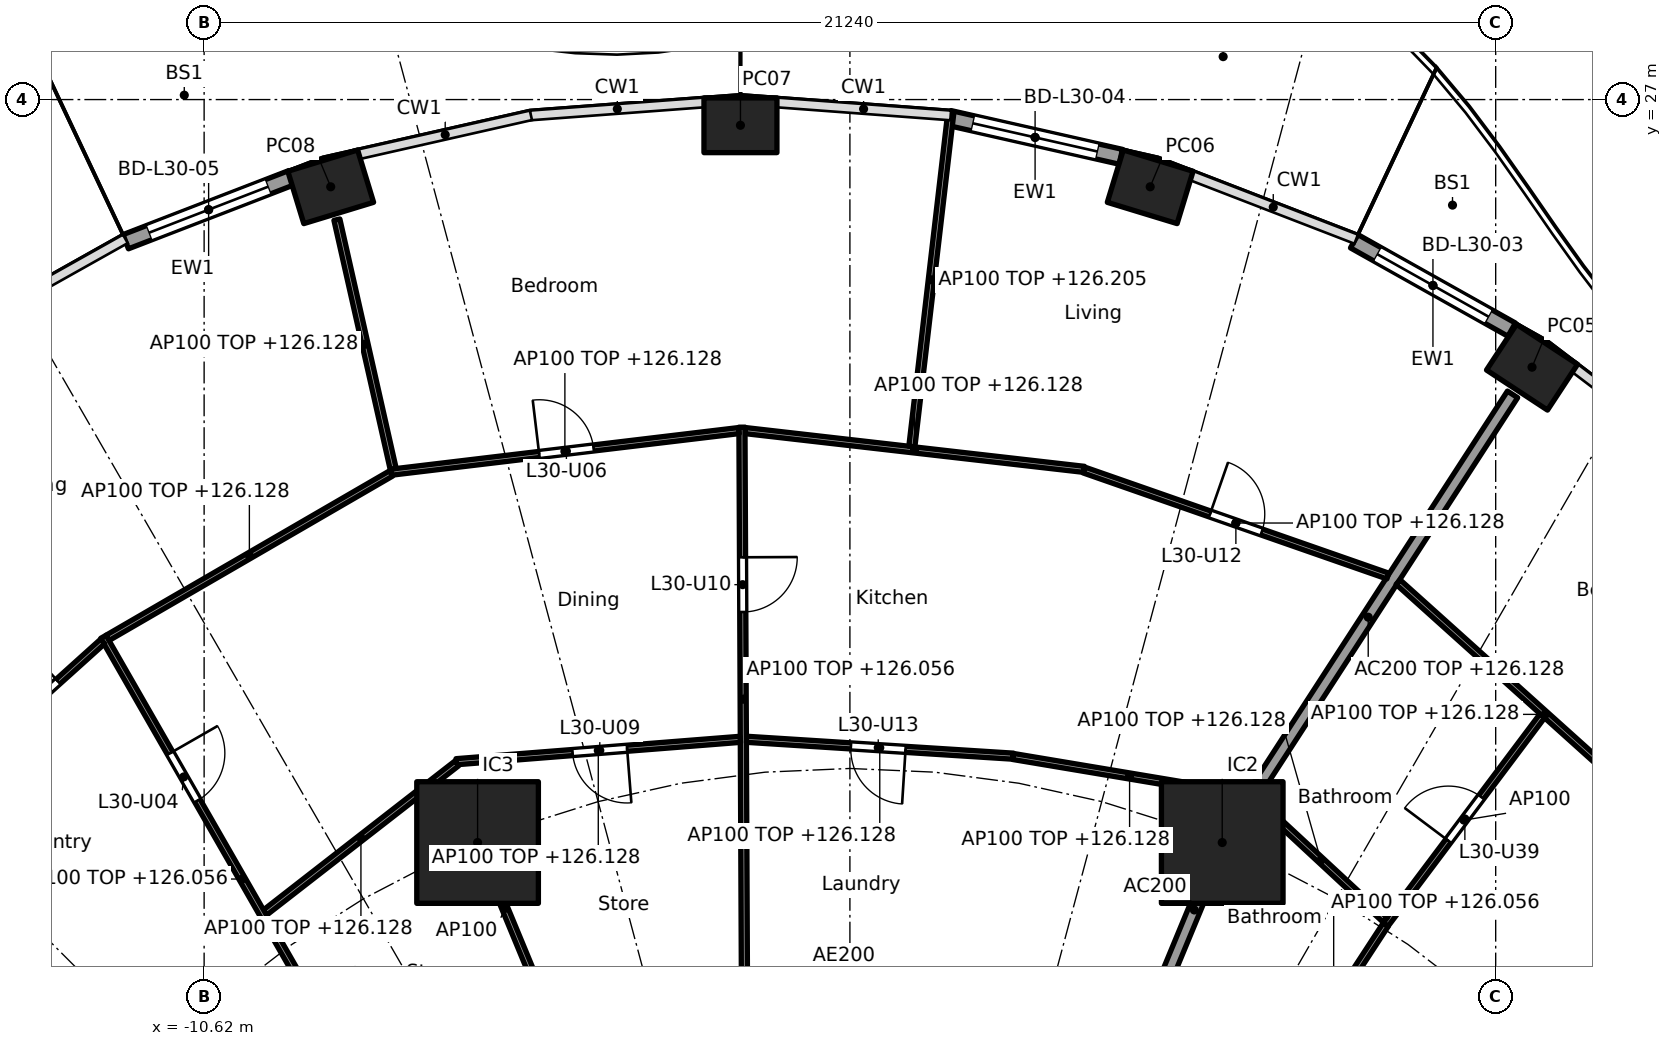
"""IFC4 building model, lengths in metres.
Left out: names, types, materials, properties, quantities, classifications, styles, units other than length and angle.
Written with IfcOpenShell. Run it as: python <this file> out.ifc"""

import sys

from ifc_helpers import new_model, si_unit, direction, frame, frame_2d, origin, origin_2d, place, context, subcontext, project, spatial, rectangle, hollow_rectangle, extrude, element, fill, save


model = new_model("IFC4")
c1 = context("Model", 3, precision=1e-05, world=origin(), true_north=direction((0.0, 1.0)))
c2 = subcontext(c1, "Body", "Model", "MODEL_VIEW")
j1 = project(units=[si_unit("LENGTHUNIT", "METRE"), si_unit("PLANEANGLEUNIT", "RADIAN")], contexts=[c1])
p1 = place(None, origin())
s1 = spatial("IfcSite", under=j1, at=p1, CompositionType="ELEMENT")
p2 = place(p1, origin())
s2 = spatial("IfcBuilding", under=s1, at=p2, CompositionType="ELEMENT")
p3 = place(p2, frame((0.0, 0.0, 123.3)))
s3 = spatial("IfcBuildingStorey", under=s2, at=p3, CompositionType="ELEMENT", Elevation=123.3)
for number, where, z_axis, x_axis in (
    (1, (11.218, 22.599, 0.0), (0.0, 0.0, 1.0), (-0.836, 0.549, 0.0)),
    (2, (4.938, 25.565, 0.0), (0.0, 0.0, 1.0), (-0.957, 0.292, 0.0)),
    (3, (-1.8, 26.577, 0.0), (0.0, 0.0, 1.0), (-1.0, 0.0, 0.0)),
    (4, (-8.538, 25.565, 0.0), (0.0, 0.0, 1.0), (-0.957, -0.292, 0.0)),
):
    element("IfcColumn", number, at=place(p3, frame(where, z_axis=z_axis, x_axis=x_axis)), inside=s3, PredefinedType="COLUMN", context=c2, shape_type="SweptSolid", body=[
        extrude(hollow_rectangle(XDim=1.2, YDim=0.9, WallThickness=0.04, at=origin_2d()), origin(), (0.0, 0.0, 1.0), 3.7),
    ])
for number, where, z_axis, x_axis in (
    (5, (6.123, 14.782, 0.0), (0.0, 0.0, 1.0), (1.0, 0.0, 0.0)),
    (6, (-6.123, 14.782, 0.0), (0.0, 0.0, 1.0), (1.0, 0.0, 0.0)),
):
    element("IfcColumn", number, at=place(p3, frame(where, z_axis=z_axis, x_axis=x_axis)), inside=s3, PredefinedType="COLUMN", context=c2, shape_type="SweptSolid", body=[
        extrude(rectangle(XDim=2.0, YDim=2.0, at=origin_2d()), origin(), (0.0, 0.0, 1.0), 3.7),
    ])
p4 = place(p3, frame((8.293, 24.67, 0.0), z_axis=(0.0, 0.0, 1.0), x_axis=(0.87206688547, -0.489386705241, 0.0)))
e7 = element("IfcWall", 7, at=p4, inside=s3, PredefinedType="SOLIDWALL", context=c2, shape_type="SweptSolid", body=[
    extrude(rectangle(XDim=2.97, YDim=0.25, at=frame_2d((1.485, 0.0))), origin(), (0.0, 0.0, 1.0), 3.44),
])
p5 = place(p4, frame((0.435, 0.0, 0.0)))
e8 = element("IfcOpeningElement", 8, at=p5, cuts=e7, PredefinedType="OPENING", context=c2, shape_type="SweptSolid", body=[
    extrude(rectangle(XDim=2.1, YDim=2.4, at=frame_2d((1.05, 1.2))), frame((0.0, 0.135, 0.0), z_axis=(0.0, -1.0, 0.0), x_axis=(1.0, 0.0, 0.0)), (0.0, 0.0, 1.0), 0.27),
])
p6 = place(p3, frame((1.636, 26.697, 0.0), z_axis=(0.0, 0.0, 1.0), x_axis=(0.975339035722, -0.220711951186, 0.0)))
e9 = element("IfcWall", 9, at=p6, inside=s3, PredefinedType="SOLIDWALL", context=c2, shape_type="SweptSolid", body=[
    extrude(rectangle(XDim=2.89, YDim=0.25, at=frame_2d((1.445, 0.0))), origin(), (0.0, 0.0, 1.0), 3.44),
])
p7 = place(p6, frame((0.395, 0.0, 0.0)))
e10 = element("IfcOpeningElement", 10, at=p7, cuts=e9, PredefinedType="OPENING", context=c2, shape_type="SweptSolid", body=[
    extrude(rectangle(XDim=2.1, YDim=2.4, at=frame_2d((1.05, 1.2))), frame((0.0, 0.135, 0.0), z_axis=(0.0, -1.0, 0.0), x_axis=(1.0, 0.0, 0.0)), (0.0, 0.0, 1.0), 0.27),
])
p8 = place(p3, frame((-11.909, 24.662, 0.0), z_axis=(0.0, 0.0, 1.0), x_axis=(0.932845344347, 0.360277064952, 0.0)))
e11 = element("IfcWall", 11, at=p8, inside=s3, PredefinedType="SOLIDWALL", context=c2, shape_type="SweptSolid", body=[
    extrude(rectangle(XDim=2.923, YDim=0.25, at=frame_2d((1.462, 0.0))), origin(), (0.0, 0.0, 1.0), 3.44),
])
p9 = place(p8, frame((0.412, 0.0, 0.0)))
e12 = element("IfcOpeningElement", 12, at=p9, cuts=e11, PredefinedType="OPENING", context=c2, shape_type="SweptSolid", body=[
    extrude(rectangle(XDim=2.1, YDim=2.4, at=frame_2d((1.05, 1.2))), frame((0.0, 0.135, 0.0), z_axis=(0.0, -1.0, 0.0), x_axis=(1.0, 0.0, 0.0)), (0.0, 0.0, 1.0), 0.27),
])
p10 = place(p3, frame((5.243, 12.657, 0.0), z_axis=(0.0, 0.0, 1.0), x_axis=(0.38273085373, 0.923859888513, 0.0)))
e13 = element("IfcWall", 13, at=p10, inside=s3, PredefinedType="PARTITIONING", context=c2, shape_type="SweptSolid", body=[
    extrude(rectangle(XDim=2.199, YDim=0.2, at=frame_2d((1.1, 0.0))), origin(), (0.0, 0.0, 1.0), 3.44),
])
p11 = place(p3, frame((6.15, 14.824, 0.0), z_axis=(0.0, 0.0, 1.0), x_axis=(0.543695254109, 0.839282711998, 0.0)))
e14 = element("IfcWall", 14, at=p11, inside=s3, PredefinedType="PARTITIONING", context=c2, shape_type="SweptSolid", body=[
    extrude(rectangle(XDim=8.731, YDim=0.2, at=frame_2d((4.366, 0.0))), origin(), (0.0, 0.0, 1.0), 2.828),
])
p12 = place(p3, frame((13.856, 14.714, 0.0), z_axis=(0.0, 0.0, 1.0), x_axis=(-0.743799395746, 0.668402916577, 0.0)))
e15 = element("IfcWall", 15, at=p12, inside=s3, PredefinedType="PARTITIONING", context=c2, shape_type="SweptSolid", body=[
    extrude(rectangle(XDim=6.509, YDim=0.1, at=frame_2d((3.254, 0.0))), origin(), (0.0, 0.0, 1.0), 2.828),
])
p13 = place(p12, frame((1.19, 0.0, 0.0)))
e16 = element("IfcOpeningElement", 16, at=p13, cuts=e15, PredefinedType="OPENING", context=c2, shape_type="SweptSolid", body=[
    extrude(rectangle(XDim=0.9, YDim=2.1, at=frame_2d((0.45, 1.05))), frame((0.0, 0.06, 0.0), z_axis=(0.0, -1.0, 0.0), x_axis=(1.0, 0.0, 0.0)), (0.0, 0.0, 1.0), 0.12),
])
p14 = place(p3, frame((7.099, 10.808, 0.0), z_axis=(0.0, 0.0, 1.0), x_axis=(0.546709757921, 0.837322184463, 0.0)))
e17 = element("IfcWall", 17, at=p14, inside=s3, PredefinedType="PARTITIONING", context=c2, shape_type="SweptSolid", body=[
    extrude(rectangle(XDim=3.134, YDim=0.1, at=frame_2d((1.567, 0.0))), origin(), (0.0, 0.0, 1.0), 2.756),
])
p15 = place(p14, frame((1.117, 0.0, 0.0)))
e18 = element("IfcOpeningElement", 18, at=p15, cuts=e17, PredefinedType="OPENING", context=c2, shape_type="SweptSolid", body=[
    extrude(rectangle(XDim=0.9, YDim=2.1, at=frame_2d((0.45, 1.05))), frame((0.0, 0.06, 0.0), z_axis=(0.0, -1.0, 0.0), x_axis=(1.0, 0.0, 0.0)), (0.0, 0.0, 1.0), 0.12),
])
p16 = place(p3, frame((8.81, 13.434, 0.0), z_axis=(0.0, 0.0, 1.0), x_axis=(0.600491337497, 0.799631261014, 0.0)))
e19 = element("IfcWall", 19, at=p16, inside=s3, PredefinedType="PARTITIONING", context=c2, shape_type="SweptSolid", body=[
    extrude(rectangle(XDim=4.292, YDim=0.1, at=frame_2d((2.146, 0.0))), origin(), (0.0, 0.0, 1.0), 3.44),
])
p17 = place(p16, frame((1.721, 0.0, 0.0)))
e20 = element("IfcOpeningElement", 20, at=p17, cuts=e19, PredefinedType="OPENING", context=c2, shape_type="SweptSolid", body=[
    extrude(rectangle(XDim=0.9, YDim=2.1, at=frame_2d((0.45, 1.05))), frame((0.0, 0.06, 0.0), z_axis=(0.0, -1.0, 0.0), x_axis=(1.0, 0.0, 0.0)), (0.0, 0.0, 1.0), 0.12),
])
p18 = place(p3, frame((8.803, 13.508, 0.0), z_axis=(0.0, 0.0, 1.0), x_axis=(-0.733124766325, 0.680094167745, 0.0)))
e21 = element("IfcWall", 21, at=p18, inside=s3, PredefinedType="PARTITIONING", context=c2, shape_type="SweptSolid", body=[
    extrude(rectangle(XDim=2.886, YDim=0.1, at=frame_2d((1.443, 0.0))), origin(), (0.0, 0.0, 1.0), 2.828),
])
p19 = place(p3, frame((6.515, 15.556, 0.0), z_axis=(0.0, 0.0, 1.0), x_axis=(-0.986271328884, 0.16513287323, 0.0)))
e22 = element("IfcWall", 22, at=p19, inside=s3, PredefinedType="PARTITIONING", context=c2, shape_type="SweptSolid", body=[
    extrude(rectangle(XDim=3.884, YDim=0.1, at=frame_2d((1.942, 0.0))), origin(), (0.0, 0.0, 1.0), 2.828),
])
p20 = place(p3, frame((8.846, 19.165, 0.0), z_axis=(0.0, 0.0, 1.0), x_axis=(-0.944186503813, 0.329411362915, 0.0)))
e23 = element("IfcWall", 23, at=p20, inside=s3, PredefinedType="PARTITIONING", context=c2, shape_type="SweptSolid", body=[
    extrude(rectangle(XDim=5.293, YDim=0.1, at=frame_2d((2.646, 0.0))), origin(), (0.0, 0.0, 1.0), 2.828),
])
p21 = place(p20, frame((2.197, 0.0, 0.0)))
e24 = element("IfcOpeningElement", 24, at=p21, cuts=e23, PredefinedType="OPENING", context=c2, shape_type="SweptSolid", body=[
    extrude(rectangle(XDim=0.9, YDim=2.1, at=frame_2d((0.45, 1.05))), frame((0.0, 0.06, 0.0), z_axis=(0.0, -1.0, 0.0), x_axis=(1.0, 0.0, 0.0)), (0.0, 0.0, 1.0), 0.12),
])
p22 = place(p3, frame((2.685, 16.202, 0.0), z_axis=(0.0, 0.0, 1.0), x_axis=(-0.998000808042, 0.063201164138, 0.0)))
e25 = element("IfcWall", 25, at=p22, inside=s3, PredefinedType="PARTITIONING", context=c2, shape_type="SweptSolid", body=[
    extrude(rectangle(XDim=4.396, YDim=0.1, at=frame_2d((2.198, 0.0))), origin(), (0.0, 0.0, 1.0), 2.828),
])
p23 = place(p22, frame((1.773, 0.0, 0.0)))
e26 = element("IfcOpeningElement", 26, at=p23, cuts=e25, PredefinedType="OPENING", context=c2, shape_type="SweptSolid", body=[
    extrude(rectangle(XDim=0.9, YDim=2.1, at=frame_2d((0.45, 1.05))), frame((0.0, 0.06, 0.0), z_axis=(0.0, -1.0, 0.0), x_axis=(1.0, 0.0, 0.0)), (0.0, 0.0, 1.0), 0.12),
])
p24 = place(p3, frame((3.851, 20.919, 0.0), z_axis=(0.0, 0.0, 1.0), x_axis=(-0.993519908136, 0.11365822512, 0.0)))
e27 = element("IfcWall", 27, at=p24, inside=s3, PredefinedType="PARTITIONING", context=c2, shape_type="SweptSolid", body=[
    extrude(rectangle(XDim=5.613, YDim=0.1, at=frame_2d((2.806, 0.0))), origin(), (0.0, 0.0, 1.0), 2.828),
])
p25 = place(p3, frame((1.019, 21.293, 0.0), z_axis=(0.0, 0.0, 1.0), x_axis=(0.11589741608, 0.993261188684, 0.0)))
e28 = element("IfcWall", 28, at=p25, inside=s3, PredefinedType="PARTITIONING", context=c2, shape_type="SweptSolid", body=[
    extrude(rectangle(XDim=5.523, YDim=0.1, at=frame_2d((2.762, 0.0))), origin(), (0.0, 0.0, 1.0), 2.905),
])
p26 = place(p3, frame((-1.735, 12.665, 0.0), z_axis=(0.0, 0.0, 1.0), x_axis=(-0.004474716456, 0.999989988406, 0.0)))
e29 = element("IfcWall", 29, at=p26, inside=s3, PredefinedType="PARTITIONING", context=c2, shape_type="SweptSolid", body=[
    extrude(rectangle(XDim=8.948, YDim=0.1, at=frame_2d((4.474, 0.0))), origin(), (0.0, 0.0, 1.0), 2.756),
])
p27 = place(p26, frame((5.908, 0.0, 0.0)))
e30 = element("IfcOpeningElement", 30, at=p27, cuts=e29, PredefinedType="OPENING", context=c2, shape_type="SweptSolid", body=[
    extrude(rectangle(XDim=0.9, YDim=2.1, at=frame_2d((0.45, 1.05))), frame((0.0, 0.06, 0.0), z_axis=(0.0, -1.0, 0.0), x_axis=(1.0, 0.0, 0.0)), (0.0, 0.0, 1.0), 0.12),
])
p28 = place(p3, frame((-1.802, 16.479, 0.0), z_axis=(0.0, 0.0, 1.0), x_axis=(-0.996909003513, -0.078564869469, 0.0)))
e31 = element("IfcWall", 31, at=p28, inside=s3, PredefinedType="PARTITIONING", context=c2, shape_type="SweptSolid", body=[
    extrude(rectangle(XDim=4.686, YDim=0.1, at=frame_2d((2.343, 0.0))), origin(), (0.0, 0.0, 1.0), 2.828),
])
p29 = place(p28, frame((1.868, 0.0, 0.0)))
e32 = element("IfcOpeningElement", 32, at=p29, cuts=e31, PredefinedType="OPENING", context=c2, shape_type="SweptSolid", body=[
    extrude(rectangle(XDim=0.9, YDim=2.1, at=frame_2d((0.45, 1.05))), frame((0.0, 0.06, 0.0), z_axis=(0.0, -1.0, 0.0), x_axis=(1.0, 0.0, 0.0)), (0.0, 0.0, 1.0), 0.12),
])
p30 = place(p3, frame((-1.825, 21.557, 0.0), z_axis=(0.0, 0.0, 1.0), x_axis=(-0.992915657947, -0.118821278412, 0.0)))
e33 = element("IfcWall", 33, at=p30, inside=s3, PredefinedType="PARTITIONING", context=c2, shape_type="SweptSolid", body=[
    extrude(rectangle(XDim=5.765, YDim=0.1, at=frame_2d((2.883, 0.0))), origin(), (0.0, 0.0, 1.0), 2.828),
])
p31 = place(p30, frame((2.408, 0.0, 0.0)))
e34 = element("IfcOpeningElement", 34, at=p31, cuts=e33, PredefinedType="OPENING", context=c2, shape_type="SweptSolid", body=[
    extrude(rectangle(XDim=0.9, YDim=2.1, at=frame_2d((0.45, 1.05))), frame((0.0, 0.06, 0.0), z_axis=(0.0, -1.0, 0.0), x_axis=(1.0, 0.0, 0.0)), (0.0, 0.0, 1.0), 0.12),
])
p32 = place(p3, frame((-5.243, 12.657, 0.0), z_axis=(0.0, 0.0, 1.0), x_axis=(-0.382719158442, 0.923864733477, 0.0)))
e35 = element("IfcWall", 35, at=p32, inside=s3, PredefinedType="PARTITIONING", context=c2, shape_type="SweptSolid", body=[
    extrude(rectangle(XDim=2.25, YDim=0.1, at=frame_2d((1.125, 0.0))), origin(), (0.0, 0.0, 1.0), 3.44),
])
p33 = place(p3, frame((-6.463, 16.084, 0.0), z_axis=(0.0, 0.0, 1.0), x_axis=(-0.789457442969, -0.613805299538, 0.0)))
e36 = element("IfcWall", 36, at=p33, inside=s3, PredefinedType="PARTITIONING", context=c2, shape_type="SweptSolid", body=[
    extrude(rectangle(XDim=3.997, YDim=0.1, at=frame_2d((1.999, 0.0))), origin(), (0.0, 0.0, 1.0), 2.828),
])
p34 = place(p3, frame((-7.511, 20.927, 0.0), z_axis=(0.0, 0.0, 1.0), x_axis=(-0.220337559031, 0.975423682345, 0.0)))
e37 = element("IfcWall", 37, at=p34, inside=s3, PredefinedType="PARTITIONING", context=c2, shape_type="SweptSolid", body=[
    extrude(rectangle(XDim=4.202, YDim=0.1, at=frame_2d((2.101, 0.0))), origin(), (0.0, 0.0, 1.0), 2.828),
])
p35 = place(p3, frame((-7.543, 20.853, 0.0), z_axis=(0.0, 0.0, 1.0), x_axis=(-0.865086194899, -0.501623240485, 0.0)))
e38 = element("IfcWall", 38, at=p35, inside=s3, PredefinedType="PARTITIONING", context=c2, shape_type="SweptSolid", body=[
    extrude(rectangle(XDim=5.393, YDim=0.1, at=frame_2d((2.697, 0.0))), origin(), (0.0, 0.0, 1.0), 2.828),
])
p36 = place(p3, frame((-7.708, 10.198, 0.0), z_axis=(0.0, 0.0, 1.0), x_axis=(-0.497449462689, 0.867492957937, 0.0)))
e39 = element("IfcWall", 39, at=p36, inside=s3, PredefinedType="PARTITIONING", context=c2, shape_type="SweptSolid", body=[
    extrude(rectangle(XDim=9.185, YDim=0.1, at=frame_2d((4.592, 0.0))), origin(), (0.0, 0.0, 1.0), 2.756),
])
p37 = place(p36, frame((1.511, 0.0, 0.0)))
e40 = element("IfcOpeningElement", 40, at=p37, cuts=e39, PredefinedType="OPENING", context=c2, shape_type="SweptSolid", body=[
    extrude(rectangle(XDim=0.9, YDim=2.1, at=frame_2d((0.45, 1.05))), frame((0.0, 0.06, 0.0), z_axis=(0.0, -1.0, 0.0), x_axis=(1.0, 0.0, 0.0)), (0.0, 0.0, 1.0), 0.12),
])
p38 = place(p36, frame((6.078, 0.0, 0.0)))
e41 = element("IfcOpeningElement", 41, at=p38, cuts=e39, PredefinedType="OPENING", context=c2, shape_type="SweptSolid", body=[
    extrude(rectangle(XDim=0.9, YDim=2.1, at=frame_2d((0.45, 1.05))), frame((0.0, 0.06, 0.0), z_axis=(0.0, -1.0, 0.0), x_axis=(1.0, 0.0, 0.0)), (0.0, 0.0, 1.0), 0.12),
])
p39 = place(p3, frame((-12.289, 18.089, 0.0), z_axis=(0.0, 0.0, 1.0), x_axis=(-0.743146066164, -0.669129228435, 0.0)))
e42 = element("IfcWall", 42, at=p39, inside=s3, PredefinedType="PARTITIONING", context=c2, shape_type="SweptSolid", body=[
    extrude(rectangle(XDim=5.739, YDim=0.1, at=frame_2d((2.87, 0.0))), origin(), (0.0, 0.0, 1.0), 2.828),
])
p40 = place(p39, frame((0.985, 0.0, 0.0)))
e43 = element("IfcOpeningElement", 43, at=p40, cuts=e42, PredefinedType="OPENING", context=c2, shape_type="SweptSolid", body=[
    extrude(rectangle(XDim=0.9, YDim=2.1, at=frame_2d((0.45, 1.05))), frame((0.0, 0.06, 0.0), z_axis=(0.0, -1.0, 0.0), x_axis=(1.0, 0.0, 0.0)), (0.0, 0.0, 1.0), 0.12),
])
p41 = place(p3, frame((-10.182, 7.729, 0.0), z_axis=(0.0, 0.0, 1.0), x_axis=(-0.702927211734, 0.711261790766, 0.0)))
e44 = element("IfcWall", 44, at=p41, inside=s3, PredefinedType="PARTITIONING", context=c2, shape_type="SweptSolid", body=[
    extrude(rectangle(XDim=9.168, YDim=0.1, at=frame_2d((4.584, 0.0))), origin(), (0.0, 0.0, 1.0), 2.756),
])
p42 = place(p41, frame((1.507, 0.0, 0.0)))
e45 = element("IfcOpeningElement", 45, at=p42, cuts=e44, PredefinedType="OPENING", context=c2, shape_type="SweptSolid", body=[
    extrude(rectangle(XDim=0.9, YDim=2.1, at=frame_2d((0.45, 1.05))), frame((0.0, 0.06, 0.0), z_axis=(0.0, -1.0, 0.0), x_axis=(1.0, 0.0, 0.0)), (0.0, 0.0, 1.0), 0.12),
])
p43 = place(p41, frame((6.067, 0.0, 0.0)))
e46 = element("IfcOpeningElement", 46, at=p43, cuts=e44, PredefinedType="OPENING", context=c2, shape_type="SweptSolid", body=[
    extrude(rectangle(XDim=0.9, YDim=2.1, at=frame_2d((0.45, 1.05))), frame((0.0, 0.06, 0.0), z_axis=(0.0, -1.0, 0.0), x_axis=(1.0, 0.0, 0.0)), (0.0, 0.0, 1.0), 0.12),
])
p44 = place(p5, origin())
e47 = element("IfcDoor", 47, at=p44, inside=s3, OperationType="SLIDING_TO_LEFT", PredefinedType="DOOR", context=c2, shape_type="SweptSolid", body=[
    extrude(rectangle(XDim=2.1, YDim=2.4, at=frame_2d((1.05, 1.2))), frame((0.0, 0.025, 0.0), z_axis=(0.0, -1.0, 0.0), x_axis=(1.0, 0.0, 0.0)), (0.0, 0.0, 1.0), 0.05),
])
fill(e8, e47)
p45 = place(p7, origin())
e48 = element("IfcDoor", 48, at=p45, inside=s3, OperationType="SLIDING_TO_LEFT", PredefinedType="DOOR", context=c2, shape_type="SweptSolid", body=[
    extrude(rectangle(XDim=2.1, YDim=2.4, at=frame_2d((1.05, 1.2))), frame((0.0, 0.025, 0.0), z_axis=(0.0, -1.0, 0.0), x_axis=(1.0, 0.0, 0.0)), (0.0, 0.0, 1.0), 0.05),
])
fill(e10, e48)
p46 = place(p9, origin())
e49 = element("IfcDoor", 49, at=p46, inside=s3, OperationType="SLIDING_TO_LEFT", PredefinedType="DOOR", context=c2, shape_type="SweptSolid", body=[
    extrude(rectangle(XDim=2.1, YDim=2.4, at=frame_2d((1.05, 1.2))), frame((0.0, 0.025, 0.0), z_axis=(0.0, -1.0, 0.0), x_axis=(1.0, 0.0, 0.0)), (0.0, 0.0, 1.0), 0.05),
])
fill(e12, e49)
p47 = place(p38, frame((0.9, 0.0, 0.0), x_axis=(-1.0, 0.0, 0.0)))
e50 = element("IfcDoor", 50, at=p47, inside=s3, OperationType="SINGLE_SWING_LEFT", PredefinedType="DOOR", context=c2, shape_type="SweptSolid", body=[
    extrude(rectangle(XDim=0.9, YDim=2.1, at=frame_2d((0.45, 1.05))), frame((0.0, 0.025, 0.0), z_axis=(0.0, -1.0, 0.0), x_axis=(1.0, 0.0, 0.0)), (0.0, 0.0, 1.0), 0.05),
])
fill(e41, e50)
p48 = place(p31, frame((0.9, 0.0, 0.0), x_axis=(-1.0, 0.0, 0.0)))
e51 = element("IfcDoor", 51, at=p48, inside=s3, OperationType="SINGLE_SWING_LEFT", PredefinedType="DOOR", context=c2, shape_type="SweptSolid", body=[
    extrude(rectangle(XDim=0.9, YDim=2.1, at=frame_2d((0.45, 1.05))), frame((0.0, 0.025, 0.0), z_axis=(0.0, -1.0, 0.0), x_axis=(1.0, 0.0, 0.0)), (0.0, 0.0, 1.0), 0.05),
])
fill(e34, e51)
p49 = place(p40, frame((0.9, 0.0, 0.0), x_axis=(-1.0, 0.0, 0.0)))
e52 = element("IfcDoor", 52, at=p49, inside=s3, OperationType="SINGLE_SWING_RIGHT", PredefinedType="DOOR", context=c2, shape_type="SweptSolid", body=[
    extrude(rectangle(XDim=0.9, YDim=2.1, at=frame_2d((0.45, 1.05))), frame((0.0, 0.025, 0.0), z_axis=(0.0, -1.0, 0.0), x_axis=(1.0, 0.0, 0.0)), (0.0, 0.0, 1.0), 0.05),
])
fill(e43, e52)
p50 = place(p29, origin())
e53 = element("IfcDoor", 53, at=p50, inside=s3, OperationType="SINGLE_SWING_LEFT", PredefinedType="DOOR", context=c2, shape_type="SweptSolid", body=[
    extrude(rectangle(XDim=0.9, YDim=2.1, at=frame_2d((0.45, 1.05))), frame((0.0, 0.025, 0.0), z_axis=(0.0, -1.0, 0.0), x_axis=(1.0, 0.0, 0.0)), (0.0, 0.0, 1.0), 0.05),
])
fill(e32, e53)
p51 = place(p27, frame((0.9, 0.0, 0.0), x_axis=(-1.0, 0.0, 0.0)))
e54 = element("IfcDoor", 54, at=p51, inside=s3, OperationType="SINGLE_SWING_LEFT", PredefinedType="DOOR", context=c2, shape_type="SweptSolid", body=[
    extrude(rectangle(XDim=0.9, YDim=2.1, at=frame_2d((0.45, 1.05))), frame((0.0, 0.025, 0.0), z_axis=(0.0, -1.0, 0.0), x_axis=(1.0, 0.0, 0.0)), (0.0, 0.0, 1.0), 0.05),
])
fill(e30, e54)
p52 = place(p21, frame((0.9, 0.0, 0.0), x_axis=(-1.0, 0.0, 0.0)))
e55 = element("IfcDoor", 55, at=p52, inside=s3, OperationType="SINGLE_SWING_LEFT", PredefinedType="DOOR", context=c2, shape_type="SweptSolid", body=[
    extrude(rectangle(XDim=0.9, YDim=2.1, at=frame_2d((0.45, 1.05))), frame((0.0, 0.025, 0.0), z_axis=(0.0, -1.0, 0.0), x_axis=(1.0, 0.0, 0.0)), (0.0, 0.0, 1.0), 0.05),
])
fill(e24, e55)
p53 = place(p23, origin())
e56 = element("IfcDoor", 56, at=p53, inside=s3, OperationType="SINGLE_SWING_LEFT", PredefinedType="DOOR", context=c2, shape_type="SweptSolid", body=[
    extrude(rectangle(XDim=0.9, YDim=2.1, at=frame_2d((0.45, 1.05))), frame((0.0, 0.025, 0.0), z_axis=(0.0, -1.0, 0.0), x_axis=(1.0, 0.0, 0.0)), (0.0, 0.0, 1.0), 0.05),
])
fill(e26, e56)
p54 = place(p17, origin())
e57 = element("IfcDoor", 57, at=p54, inside=s3, OperationType="SINGLE_SWING_LEFT", PredefinedType="DOOR", context=c2, shape_type="SweptSolid", body=[
    extrude(rectangle(XDim=0.9, YDim=2.1, at=frame_2d((0.45, 1.05))), frame((0.0, 0.025, 0.0), z_axis=(0.0, -1.0, 0.0), x_axis=(1.0, 0.0, 0.0)), (0.0, 0.0, 1.0), 0.05),
])
fill(e20, e57)
save(model, sys.argv[1])
